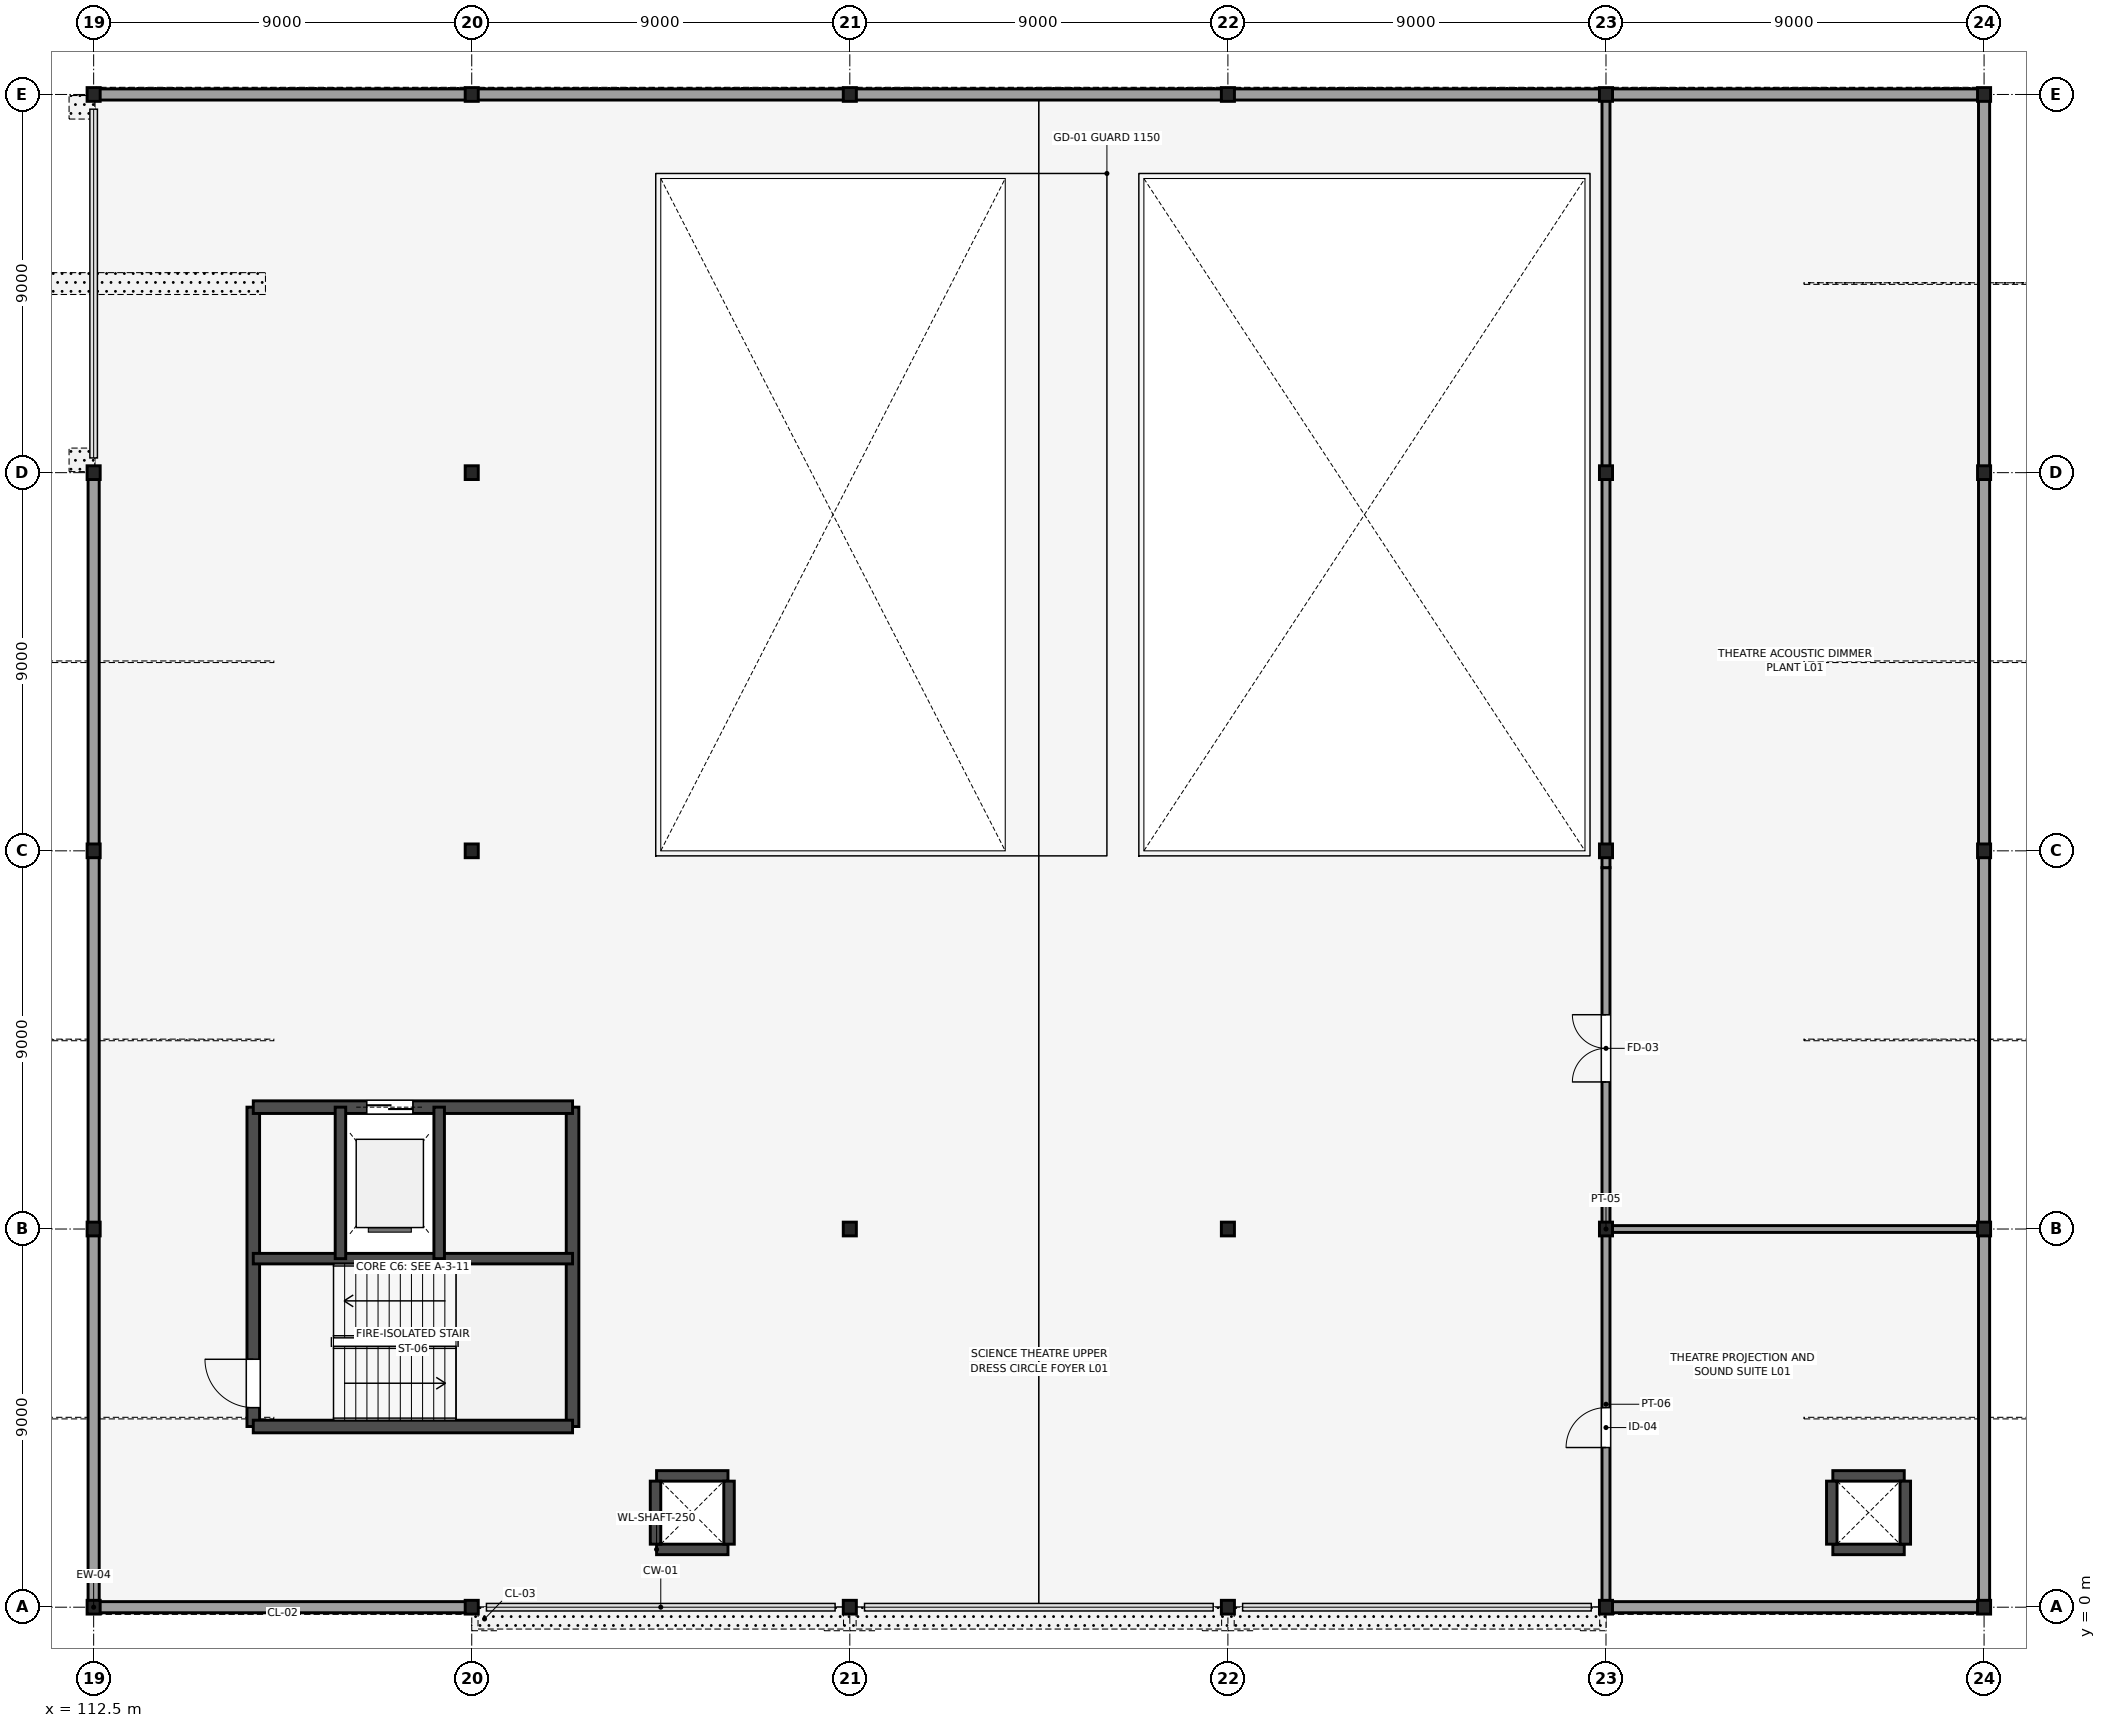
"""IFC4 building model, lengths in metres.
Left out: names, types, materials, properties, quantities, classifications, styles, units other than length and angle.
Written with IfcOpenShell. Run it as: python <this file> out.ifc"""

import sys

from ifc_helpers import new_model, si_unit, direction, frame, frame_2d, origin, origin_2d, place, context, subcontext, project, spatial, rectangle, i_section, extrude, element, fill, save


model = new_model("IFC4")
c1 = context("Model", 3, precision=1e-05, world=origin(), true_north=direction((0.0, 1.0)))
c2 = subcontext(c1, "Body", "Model", "MODEL_VIEW")
j1 = project(units=[si_unit("LENGTHUNIT", "METRE"), si_unit("PLANEANGLEUNIT", "RADIAN")], contexts=[c1])
p1 = place(None, origin())
s1 = spatial("IfcSite", under=j1, at=p1, CompositionType="ELEMENT")
p2 = place(p1, origin())
s2 = spatial("IfcBuilding", under=s1, at=p2, CompositionType="ELEMENT")
p3 = place(p2, frame((0.0, 0.0, 5.4)))
s3 = spatial("IfcBuildingStorey", under=s2, at=p3, CompositionType="ELEMENT", Elevation=5.4)
for number, where, z_axis, x_axis in (
    (1, (112.5, 0.0, 0.0), (0.0, 0.0, 1.0), (1.0, 0.0, 0.0)),
    (2, (112.5, 9.0, 0.0), (0.0, 0.0, 1.0), (1.0, 0.0, 0.0)),
    (3, (112.5, 18.0, 0.0), (0.0, 0.0, 1.0), (1.0, 0.0, 0.0)),
    (4, (112.5, 27.0, 0.0), (0.0, 0.0, 1.0), (1.0, 0.0, 0.0)),
    (5, (112.5, 36.0, 0.0), (0.0, 0.0, 1.0), (1.0, 0.0, 0.0)),
    (6, (121.5, 0.0, 0.0), (0.0, 0.0, 1.0), (1.0, 0.0, 0.0)),
    (7, (121.5, 18.0, 0.0), (0.0, 0.0, 1.0), (1.0, 0.0, 0.0)),
    (8, (121.5, 27.0, 0.0), (0.0, 0.0, 1.0), (1.0, 0.0, 0.0)),
    (9, (121.5, 36.0, 0.0), (0.0, 0.0, 1.0), (1.0, 0.0, 0.0)),
    (10, (130.5, 0.0, 0.0), (0.0, 0.0, 1.0), (1.0, 0.0, 0.0)),
    (11, (130.5, 9.0, 0.0), (0.0, 0.0, 1.0), (1.0, 0.0, 0.0)),
    (12, (130.5, 36.0, 0.0), (0.0, 0.0, 1.0), (1.0, 0.0, 0.0)),
    (13, (139.5, 0.0, 0.0), (0.0, 0.0, 1.0), (1.0, 0.0, 0.0)),
    (14, (139.5, 9.0, 0.0), (0.0, 0.0, 1.0), (1.0, 0.0, 0.0)),
    (15, (139.5, 36.0, 0.0), (0.0, 0.0, 1.0), (1.0, 0.0, 0.0)),
    (16, (148.5, 0.0, 0.0), (0.0, 0.0, 1.0), (1.0, 0.0, 0.0)),
    (17, (148.5, 9.0, 0.0), (0.0, 0.0, 1.0), (1.0, 0.0, 0.0)),
    (18, (148.5, 18.0, 0.0), (0.0, 0.0, 1.0), (1.0, 0.0, 0.0)),
    (19, (148.5, 27.0, 0.0), (0.0, 0.0, 1.0), (1.0, 0.0, 0.0)),
    (20, (148.5, 36.0, 0.0), (0.0, 0.0, 1.0), (1.0, 0.0, 0.0)),
    (21, (157.5, 0.0, 0.0), (0.0, 0.0, 1.0), (1.0, 0.0, 0.0)),
    (22, (157.5, 9.0, 0.0), (0.0, 0.0, 1.0), (1.0, 0.0, 0.0)),
    (23, (157.5, 18.0, 0.0), (0.0, 0.0, 1.0), (1.0, 0.0, 0.0)),
    (24, (157.5, 27.0, 0.0), (0.0, 0.0, 1.0), (1.0, 0.0, 0.0)),
    (25, (157.5, 36.0, 0.0), (0.0, 0.0, 1.0), (1.0, 0.0, 0.0)),
):
    element("IfcColumn", number, at=place(p3, frame(where, z_axis=z_axis, x_axis=x_axis)), inside=s3, PredefinedType="COLUMN", context=c2, shape_type="SweptSolid", body=[
        extrude(i_section(OverallWidth=0.311, OverallDepth=0.327, WebThickness=0.016, FlangeThickness=0.025, FilletRadius=0.017, at=origin_2d()), origin(), (0.0, 0.0, 1.0), 4.5),
    ])
p4 = place(p3, frame((116.3, 4.3, 0.0), z_axis=(0.0, 0.0, 1.0), x_axis=(0.0, 1.0, 0.0)))
e26 = element("IfcWall", 26, at=p4, inside=s3, PredefinedType="SHEAR", context=c2, shape_type="SweptSolid", body=[
    extrude(rectangle(XDim=7.6, YDim=0.3, at=frame_2d((3.8, 0.0))), origin(), (0.0, 0.0, 1.0), 4.5),
])
p5 = place(p4, frame((0.45, 0.0, 0.0)))
e27 = element("IfcOpeningElement", 27, at=p5, cuts=e26, PredefinedType="OPENING", context=c2, shape_type="SweptSolid", body=[
    extrude(rectangle(XDim=1.15, YDim=2.15, at=frame_2d((0.575, 1.075))), frame((0.0, 0.16, 0.0), z_axis=(0.0, -1.0, 0.0), x_axis=(1.0, 0.0, 0.0)), (0.0, 0.0, 1.0), 0.32),
])
for number, where, z_axis, x_axis in (
    (28, (123.9, 4.3, 0.0), (0.0, 0.0, 1.0), (0.0, 1.0, 0.0)),
    (29, (116.3, 4.3, 0.0), (0.0, 0.0, 1.0), (1.0, 0.0, 0.0)),
):
    element("IfcWall", number, at=place(p3, frame(where, z_axis=z_axis, x_axis=x_axis)), inside=s3, PredefinedType="SHEAR", context=c2, shape_type="SweptSolid", body=[
        extrude(rectangle(XDim=7.6, YDim=0.3, at=frame_2d((3.8, 0.0))), origin(), (0.0, 0.0, 1.0), 4.5),
    ])
p6 = place(p3, frame((116.3, 11.9, 0.0), z_axis=(0.0, 0.0, 1.0), x_axis=(1.0, 0.0, 0.0)))
e30 = element("IfcWall", 30, at=p6, inside=s3, PredefinedType="SHEAR", context=c2, shape_type="SweptSolid", body=[
    extrude(rectangle(XDim=7.6, YDim=0.3, at=frame_2d((3.8, 0.0))), origin(), (0.0, 0.0, 1.0), 4.5),
])
p7 = place(p6, frame((2.7, 0.0, 0.0)))
e31 = element("IfcOpeningElement", 31, at=p7, cuts=e30, PredefinedType="OPENING", context=c2, shape_type="SweptSolid", body=[
    extrude(rectangle(XDim=1.1, YDim=2.2, at=frame_2d((0.55, 1.1))), frame((0.0, 0.16, 0.0), z_axis=(0.0, -1.0, 0.0), x_axis=(1.0, 0.0, 0.0)), (0.0, 0.0, 1.0), 0.32),
])
p8 = place(p3, frame((116.3, 8.295, 0.0), z_axis=(0.0, 0.0, 1.0), x_axis=(1.0, 0.0, 0.0)))
e32 = element("IfcWall", 32, at=p8, inside=s3, PredefinedType="SHEAR", context=c2, shape_type="SweptSolid", body=[
    extrude(rectangle(XDim=7.6, YDim=0.25, at=frame_2d((3.8, 0.0))), origin(), (0.0, 0.0, 1.0), 4.5),
])
for number, where, z_axis, x_axis in (
    (33, (118.375, 8.295, 0.0), (0.0, 0.0, 1.0), (0.0, 1.0, 0.0)),
    (34, (120.725, 8.295, 0.0), (0.0, 0.0, 1.0), (0.0, 1.0, 0.0)),
):
    element("IfcWall", number, at=place(p3, frame(where, z_axis=z_axis, x_axis=x_axis)), inside=s3, PredefinedType="SHEAR", context=c2, shape_type="SweptSolid", body=[
        extrude(rectangle(XDim=3.605, YDim=0.25, at=frame_2d((1.802, 0.0))), origin(), (0.0, 0.0, 1.0), 4.5),
    ])
for number, where, z_axis, x_axis in (
    (35, (125.9, 1.375, 0.0), (0.0, 0.0, 1.0), (1.0, 0.0, 0.0)),
    (36, (125.9, 3.125, 0.0), (0.0, 0.0, 1.0), (1.0, 0.0, 0.0)),
):
    element("IfcWall", number, at=place(p3, frame(where, z_axis=z_axis, x_axis=x_axis)), inside=s3, PredefinedType="SHEAR", context=c2, shape_type="SweptSolid", body=[
        extrude(rectangle(XDim=1.7, YDim=0.25, at=frame_2d((0.85, 0.0))), origin(), (0.0, 0.0, 1.0), 3.77),
    ])
for number, where, z_axis, x_axis in (
    (37, (125.875, 1.5, 0.0), (0.0, 0.0, 1.0), (0.0, 1.0, 0.0)),
    (38, (127.625, 1.5, 0.0), (0.0, 0.0, 1.0), (0.0, 1.0, 0.0)),
):
    element("IfcWall", number, at=place(p3, frame(where, z_axis=z_axis, x_axis=x_axis)), inside=s3, PredefinedType="SHEAR", context=c2, shape_type="SweptSolid", body=[
        extrude(rectangle(XDim=1.5, YDim=0.25, at=frame_2d((0.75, 0.0))), origin(), (0.0, 0.0, 1.0), 3.77),
    ])
for number, where, z_axis, x_axis in (
    (39, (153.9, 1.375, 0.0), (0.0, 0.0, 1.0), (1.0, 0.0, 0.0)),
    (40, (153.9, 3.125, 0.0), (0.0, 0.0, 1.0), (1.0, 0.0, 0.0)),
):
    element("IfcWall", number, at=place(p3, frame(where, z_axis=z_axis, x_axis=x_axis)), inside=s3, PredefinedType="SHEAR", context=c2, shape_type="SweptSolid", body=[
        extrude(rectangle(XDim=1.7, YDim=0.25, at=frame_2d((0.85, 0.0))), origin(), (0.0, 0.0, 1.0), 3.77),
    ])
for number, where, z_axis, x_axis in (
    (41, (153.875, 1.5, 0.0), (0.0, 0.0, 1.0), (0.0, 1.0, 0.0)),
    (42, (155.625, 1.5, 0.0), (0.0, 0.0, 1.0), (0.0, 1.0, 0.0)),
):
    element("IfcWall", number, at=place(p3, frame(where, z_axis=z_axis, x_axis=x_axis)), inside=s3, PredefinedType="SHEAR", context=c2, shape_type="SweptSolid", body=[
        extrude(rectangle(XDim=1.5, YDim=0.25, at=frame_2d((0.75, 0.0))), origin(), (0.0, 0.0, 1.0), 3.77),
    ])
p9 = place(p3, frame((112.5, 0.0, 0.0), z_axis=(0.0, 0.0, 1.0), x_axis=(1.0, 0.0, 0.0)))
e43 = element("IfcWall", 43, at=p9, inside=s3, PredefinedType="STANDARD", context=c2, shape_type="SweptSolid", body=[
    extrude(rectangle(XDim=9.0, YDim=0.265, at=frame_2d((4.5, 0.0))), origin(), (0.0, 0.0, 1.0), 3.846),
])
for number, where, z_axis, x_axis in (
    (44, (121.5, 36.0, 0.0), (0.0, 0.0, 1.0), (-1.0, 0.0, 0.0)),
    (45, (130.5, 36.0, 0.0), (0.0, 0.0, 1.0), (-1.0, 0.0, 0.0)),
    (46, (139.5, 36.0, 0.0), (0.0, 0.0, 1.0), (-1.0, 0.0, 0.0)),
    (47, (148.5, 36.0, 0.0), (0.0, 0.0, 1.0), (-1.0, 0.0, 0.0)),
):
    element("IfcWall", number, at=place(p3, frame(where, z_axis=z_axis, x_axis=x_axis)), inside=s3, PredefinedType="STANDARD", context=c2, shape_type="SweptSolid", body=[
        extrude(rectangle(XDim=9.0, YDim=0.265, at=frame_2d((4.5, 0.0))), origin(), (0.0, 0.0, 1.0), 3.781),
    ])
p10 = place(p3, frame((148.5, 0.0, 0.0), z_axis=(0.0, 0.0, 1.0), x_axis=(1.0, 0.0, 0.0)))
e48 = element("IfcWall", 48, at=p10, inside=s3, PredefinedType="STANDARD", context=c2, shape_type="SweptSolid", body=[
    extrude(rectangle(XDim=9.0, YDim=0.265, at=frame_2d((4.5, 0.0))), origin(), (0.0, 0.0, 1.0), 3.846),
])
for number, where, z_axis, x_axis in (
    (49, (157.5, 36.0, 0.0), (0.0, 0.0, 1.0), (-1.0, 0.0, 0.0)),
    (50, (112.5, 9.0, 0.0), (0.0, 0.0, 1.0), (0.0, -1.0, 0.0)),
    (51, (157.5, 0.0, 0.0), (0.0, 0.0, 1.0), (0.0, 1.0, 0.0)),
    (52, (112.5, 18.0, 0.0), (0.0, 0.0, 1.0), (0.0, -1.0, 0.0)),
    (53, (157.5, 9.0, 0.0), (0.0, 0.0, 1.0), (0.0, 1.0, 0.0)),
    (54, (112.5, 27.0, 0.0), (0.0, 0.0, 1.0), (0.0, -1.0, 0.0)),
    (55, (157.5, 18.0, 0.0), (0.0, 0.0, 1.0), (0.0, 1.0, 0.0)),
    (56, (157.5, 27.0, 0.0), (0.0, 0.0, 1.0), (0.0, 1.0, 0.0)),
):
    element("IfcWall", number, at=place(p3, frame(where, z_axis=z_axis, x_axis=x_axis)), inside=s3, PredefinedType="STANDARD", context=c2, shape_type="SweptSolid", body=[
        extrude(rectangle(XDim=9.0, YDim=0.265, at=frame_2d((4.5, 0.0))), origin(), (0.0, 0.0, 1.0), 3.781),
    ])
p11 = place(p3, frame((148.5, 0.0, 0.0), z_axis=(0.0, 0.0, 1.0), x_axis=(0.0, 1.0, 0.0)))
e57 = element("IfcWall", 57, at=p11, inside=s3, PredefinedType="PARTITIONING", context=c2, shape_type="SweptSolid", body=[
    extrude(rectangle(XDim=9.0, YDim=0.19, at=frame_2d((4.5, 0.0))), origin(), (0.0, 0.0, 1.0), 3.781),
])
p12 = place(p11, frame((3.8, 0.0, 0.0)))
e58 = element("IfcOpeningElement", 58, at=p12, cuts=e57, PredefinedType="OPENING", context=c2, shape_type="SweptSolid", body=[
    extrude(rectangle(XDim=0.95, YDim=2.15, at=frame_2d((0.475, 1.075))), frame((0.0, 0.105, 0.0), z_axis=(0.0, -1.0, 0.0), x_axis=(1.0, 0.0, 0.0)), (0.0, 0.0, 1.0), 0.21),
])
p13 = place(p3, frame((148.5, 9.0, 0.0), z_axis=(0.0, 0.0, 1.0), x_axis=(0.0, 1.0, 0.0)))
e59 = element("IfcWall", 59, at=p13, inside=s3, PredefinedType="PARTITIONING", context=c2, shape_type="SweptSolid", body=[
    extrude(rectangle(XDim=8.6, YDim=0.19, at=frame_2d((4.3, 0.0))), origin(), (0.0, 0.0, 1.0), 3.781),
])
p14 = place(p13, frame((3.5, 0.0, 0.0)))
e60 = element("IfcOpeningElement", 60, at=p14, cuts=e59, PredefinedType="OPENING", context=c2, shape_type="SweptSolid", body=[
    extrude(rectangle(XDim=1.6, YDim=2.2, at=frame_2d((0.8, 1.1))), frame((0.0, 0.105, 0.0), z_axis=(0.0, -1.0, 0.0), x_axis=(1.0, 0.0, 0.0)), (0.0, 0.0, 1.0), 0.21),
])
p15 = place(p3, frame((148.5, 17.6, 0.0), z_axis=(0.0, 0.0, 1.0), x_axis=(0.0, 1.0, 0.0)))
e61 = element("IfcWall", 61, at=p15, inside=s3, PredefinedType="PARTITIONING", context=c2, shape_type="SweptSolid", body=[
    extrude(rectangle(XDim=18.4, YDim=0.19, at=frame_2d((9.2, 0.0))), origin(), (0.0, 0.0, 1.0), 3.781),
])
p16 = place(p3, frame((148.5, 9.0, 0.0), z_axis=(0.0, 0.0, 1.0), x_axis=(1.0, 0.0, 0.0)))
e62 = element("IfcWall", 62, at=p16, inside=s3, PredefinedType="PARTITIONING", context=c2, shape_type="SweptSolid", body=[
    extrude(rectangle(XDim=9.0, YDim=0.162, at=frame_2d((4.5, 0.0))), origin(), (0.0, 0.0, 1.0), 3.702),
])
p17 = place(p5, origin())
e63 = element("IfcDoor", 63, at=p17, inside=s3, OperationType="SINGLE_SWING_RIGHT", PredefinedType="DOOR", context=c2, shape_type="SweptSolid", body=[
    extrude(rectangle(XDim=1.15, YDim=2.15, at=frame_2d((0.575, 1.075))), frame((0.0, 0.025, 0.0), z_axis=(0.0, -1.0, 0.0), x_axis=(1.0, 0.0, 0.0)), (0.0, 0.0, 1.0), 0.05),
])
fill(e27, e63)
p18 = place(p7, origin())
e64 = element("IfcDoor", 64, at=p18, inside=s3, OperationType="DOUBLE_DOOR_SLIDING", PredefinedType="DOOR", context=c2, shape_type="SweptSolid", body=[
    extrude(rectangle(XDim=1.1, YDim=2.2, at=frame_2d((0.55, 1.1))), frame((0.0, 0.025, 0.0), z_axis=(0.0, -1.0, 0.0), x_axis=(1.0, 0.0, 0.0)), (0.0, 0.0, 1.0), 0.05),
])
fill(e31, e64)
p19 = place(p12, origin())
e65 = element("IfcDoor", 65, at=p19, inside=s3, OperationType="SINGLE_SWING_LEFT", PredefinedType="DOOR", context=c2, shape_type="SweptSolid", body=[
    extrude(rectangle(XDim=0.95, YDim=2.15, at=frame_2d((0.475, 1.075))), frame((0.0, 0.025, 0.0), z_axis=(0.0, -1.0, 0.0), x_axis=(1.0, 0.0, 0.0)), (0.0, 0.0, 1.0), 0.05),
])
fill(e58, e65)
p20 = place(p14, origin())
e66 = element("IfcDoor", 66, at=p20, inside=s3, OperationType="DOUBLE_DOOR_SINGLE_SWING", PredefinedType="DOOR", context=c2, shape_type="SweptSolid", body=[
    extrude(rectangle(XDim=1.6, YDim=2.2, at=frame_2d((0.8, 1.1))), frame((0.0, 0.025, 0.0), z_axis=(0.0, -1.0, 0.0), x_axis=(1.0, 0.0, 0.0)), (0.0, 0.0, 1.0), 0.05),
])
fill(e60, e66)
save(model, sys.argv[1])
